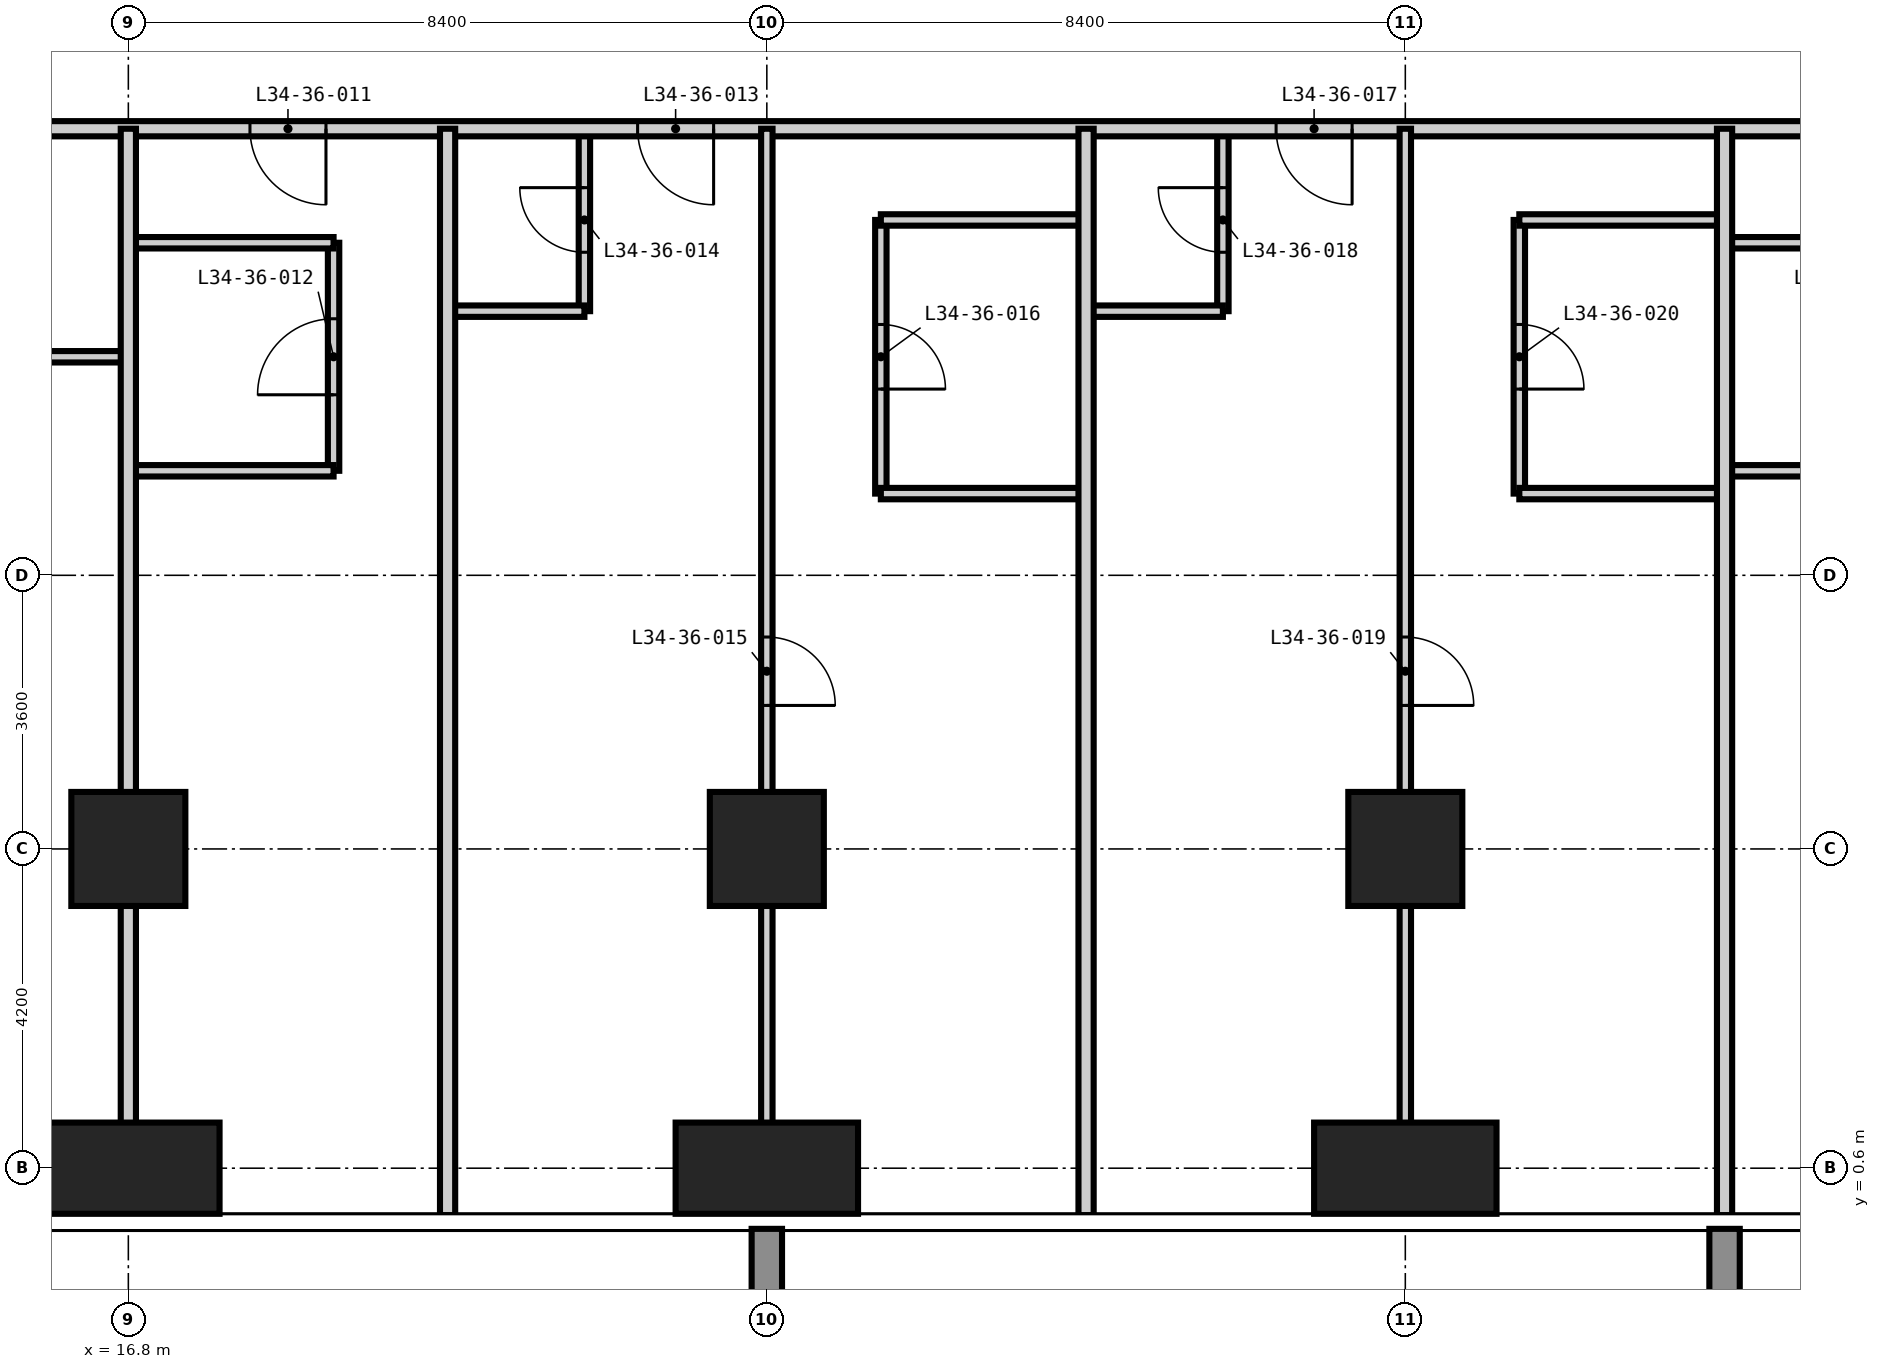
"""IFC4 building model, lengths in metres.
Left out: names, types, materials, properties, quantities, classifications, styles, units other than length and angle.
Written with IfcOpenShell. Run it as: python <this file> out.ifc"""

import sys

from ifc_helpers import new_model, si_unit, direction, frame, frame_2d, origin, origin_2d, place, context, subcontext, project, spatial, rectangle, extrude, element, fill, save


model = new_model("IFC4")
c1 = context("Model", 3, precision=1e-05, world=origin(), true_north=direction((0.0, 1.0)))
c2 = subcontext(c1, "Body", "Model", "MODEL_VIEW")
j1 = project(units=[si_unit("LENGTHUNIT", "METRE"), si_unit("PLANEANGLEUNIT", "RADIAN")], contexts=[c1])
p1 = place(None, origin())
s1 = spatial("IfcSite", under=j1, at=p1, CompositionType="ELEMENT")
p2 = place(p1, origin())
s2 = spatial("IfcBuilding", under=s1, at=p2, CompositionType="ELEMENT")
p3 = place(p2, frame((0.0, 0.0, 133.2)))
s3 = spatial("IfcBuildingStorey", under=s2, at=p3, CompositionType="ELEMENT", Elevation=133.2)
p4 = place(p3, frame((16.8, 0.6, -0.35), z_axis=(0.0, 0.0, 1.0), x_axis=(1.0, 0.0, 0.0)))
e1 = element("IfcColumn", 1, at=p4, inside=s3, PredefinedType="COLUMN", context=c2, shape_type="SweptSolid", body=[
    extrude(rectangle(XDim=2.4, YDim=1.2, at=origin_2d()), origin(), (0.0, 0.0, 1.0), 3.6),
])
p5 = place(p3, frame((16.8, 4.8, -0.35), z_axis=(0.0, 0.0, 1.0), x_axis=(1.0, 0.0, 0.0)))
e2 = element("IfcColumn", 2, at=p5, inside=s3, PredefinedType="COLUMN", context=c2, shape_type="SweptSolid", body=[
    extrude(rectangle(XDim=1.5, YDim=1.5, at=origin_2d()), origin(), (0.0, 0.0, 1.0), 3.6),
])
p6 = place(p3, frame((25.2, 0.6, -0.35), z_axis=(0.0, 0.0, 1.0), x_axis=(1.0, 0.0, 0.0)))
e3 = element("IfcColumn", 3, at=p6, inside=s3, PredefinedType="COLUMN", context=c2, shape_type="SweptSolid", body=[
    extrude(rectangle(XDim=2.4, YDim=1.2, at=origin_2d()), origin(), (0.0, 0.0, 1.0), 3.6),
])
p7 = place(p3, frame((25.2, 4.8, -0.35), z_axis=(0.0, 0.0, 1.0), x_axis=(1.0, 0.0, 0.0)))
e4 = element("IfcColumn", 4, at=p7, inside=s3, PredefinedType="COLUMN", context=c2, shape_type="SweptSolid", body=[
    extrude(rectangle(XDim=1.5, YDim=1.5, at=origin_2d()), origin(), (0.0, 0.0, 1.0), 3.6),
])
p8 = place(p3, frame((33.6, 0.6, -0.35), z_axis=(0.0, 0.0, 1.0), x_axis=(1.0, 0.0, 0.0)))
e5 = element("IfcColumn", 5, at=p8, inside=s3, PredefinedType="COLUMN", context=c2, shape_type="SweptSolid", body=[
    extrude(rectangle(XDim=2.4, YDim=1.2, at=origin_2d()), origin(), (0.0, 0.0, 1.0), 3.6),
])
p9 = place(p3, frame((33.6, 4.8, -0.35), z_axis=(0.0, 0.0, 1.0), x_axis=(1.0, 0.0, 0.0)))
e6 = element("IfcColumn", 6, at=p9, inside=s3, PredefinedType="COLUMN", context=c2, shape_type="SweptSolid", body=[
    extrude(rectangle(XDim=1.5, YDim=1.5, at=origin_2d()), origin(), (0.0, 0.0, 1.0), 3.6),
])
p10 = place(p3, frame((19.5, 9.775, 0.0), z_axis=(0.0, 0.0, 1.0), x_axis=(0.0, 1.0, 0.0)))
e7 = element("IfcWall", 7, at=p10, inside=s3, PredefinedType="PARTITIONING", context=c2, shape_type="SweptSolid", body=[
    extrude(rectangle(XDim=3.0, YDim=0.15, at=frame_2d((1.5, 0.0))), origin(), (0.0, 0.0, 1.0), 3.25),
])
p11 = place(p10, frame((1.0, 0.0, 0.0)))
e8 = element("IfcOpeningElement", 8, at=p11, cuts=e7, PredefinedType="OPENING", context=c2, shape_type="SweptSolid", body=[
    extrude(rectangle(XDim=1.0, YDim=2.1, at=frame_2d((0.5, 1.05))), frame((0.0, 0.085, 0.0), z_axis=(0.0, -1.0, 0.0), x_axis=(1.0, 0.0, 0.0)), (0.0, 0.0, 1.0), 0.17),
])
p12 = place(p3, frame((22.8, 11.875, 0.0), z_axis=(0.0, 0.0, 1.0), x_axis=(0.0, 1.0, 0.0)))
e9 = element("IfcWall", 9, at=p12, inside=s3, PredefinedType="PARTITIONING", context=c2, shape_type="SweptSolid", body=[
    extrude(rectangle(XDim=2.4, YDim=0.15, at=frame_2d((1.2, 0.0))), origin(), (0.0, 0.0, 1.0), 3.25),
])
p13 = place(p12, frame((0.775, 0.0, 0.0)))
e10 = element("IfcOpeningElement", 10, at=p13, cuts=e9, PredefinedType="OPENING", context=c2, shape_type="SweptSolid", body=[
    extrude(rectangle(XDim=0.85, YDim=2.1, at=frame_2d((0.425, 1.05))), frame((0.0, 0.085, 0.0), z_axis=(0.0, -1.0, 0.0), x_axis=(1.0, 0.0, 0.0)), (0.0, 0.0, 1.0), 0.17),
])
p14 = place(p3, frame((26.7, 9.475, 0.0), z_axis=(0.0, 0.0, 1.0), x_axis=(0.0, 1.0, 0.0)))
e11 = element("IfcWall", 11, at=p14, inside=s3, PredefinedType="PARTITIONING", context=c2, shape_type="SweptSolid", body=[
    extrude(rectangle(XDim=3.6, YDim=0.15, at=frame_2d((1.8, 0.0))), origin(), (0.0, 0.0, 1.0), 3.25),
])
p15 = place(p14, frame((1.375, 0.0, 0.0)))
e12 = element("IfcOpeningElement", 12, at=p15, cuts=e11, PredefinedType="OPENING", context=c2, shape_type="SweptSolid", body=[
    extrude(rectangle(XDim=0.85, YDim=2.1, at=frame_2d((0.425, 1.05))), frame((0.0, 0.085, 0.0), z_axis=(0.0, -1.0, 0.0), x_axis=(1.0, 0.0, 0.0)), (0.0, 0.0, 1.0), 0.17),
])
p16 = place(p3, frame((31.2, 11.875, 0.0), z_axis=(0.0, 0.0, 1.0), x_axis=(0.0, 1.0, 0.0)))
e13 = element("IfcWall", 13, at=p16, inside=s3, PredefinedType="PARTITIONING", context=c2, shape_type="SweptSolid", body=[
    extrude(rectangle(XDim=2.4, YDim=0.15, at=frame_2d((1.2, 0.0))), origin(), (0.0, 0.0, 1.0), 3.25),
])
p17 = place(p16, frame((0.775, 0.0, 0.0)))
e14 = element("IfcOpeningElement", 14, at=p17, cuts=e13, PredefinedType="OPENING", context=c2, shape_type="SweptSolid", body=[
    extrude(rectangle(XDim=0.85, YDim=2.1, at=frame_2d((0.425, 1.05))), frame((0.0, 0.085, 0.0), z_axis=(0.0, -1.0, 0.0), x_axis=(1.0, 0.0, 0.0)), (0.0, 0.0, 1.0), 0.17),
])
p18 = place(p3, frame((35.1, 9.475, 0.0), z_axis=(0.0, 0.0, 1.0), x_axis=(0.0, 1.0, 0.0)))
e15 = element("IfcWall", 15, at=p18, inside=s3, PredefinedType="PARTITIONING", context=c2, shape_type="SweptSolid", body=[
    extrude(rectangle(XDim=3.6, YDim=0.15, at=frame_2d((1.8, 0.0))), origin(), (0.0, 0.0, 1.0), 3.25),
])
p19 = place(p18, frame((1.375, 0.0, 0.0)))
e16 = element("IfcOpeningElement", 16, at=p19, cuts=e15, PredefinedType="OPENING", context=c2, shape_type="SweptSolid", body=[
    extrude(rectangle(XDim=0.85, YDim=2.1, at=frame_2d((0.425, 1.05))), frame((0.0, 0.085, 0.0), z_axis=(0.0, -1.0, 0.0), x_axis=(1.0, 0.0, 0.0)), (0.0, 0.0, 1.0), 0.17),
])
for number, where, z_axis, x_axis in (
    (17, (26.7, 9.475, 0.0), (0.0, 0.0, 1.0), (1.0, 0.0, 0.0)),
    (18, (35.1, 9.475, 0.0), (0.0, 0.0, 1.0), (1.0, 0.0, 0.0)),
    (19, (16.8, 9.775, 0.0), (0.0, 0.0, 1.0), (1.0, 0.0, 0.0)),
    (20, (37.8, 9.775, 0.0), (0.0, 0.0, 1.0), (1.0, 0.0, 0.0)),
):
    element("IfcWall", number, at=place(p3, frame(where, z_axis=z_axis, x_axis=x_axis)), inside=s3, PredefinedType="PARTITIONING", context=c2, shape_type="SweptSolid", body=[
        extrude(rectangle(XDim=2.7, YDim=0.15, at=frame_2d((1.35, 0.0))), origin(), (0.0, 0.0, 1.0), 3.25),
    ])
p20 = place(p3, frame((12.6, 11.275, 0.0), z_axis=(0.0, 0.0, 1.0), x_axis=(1.0, 0.0, 0.0)))
e21 = element("IfcWall", 21, at=p20, inside=s3, PredefinedType="PARTITIONING", context=c2, shape_type="SweptSolid", body=[
    extrude(rectangle(XDim=4.2, YDim=0.15, at=frame_2d((2.1, 0.0))), origin(), (0.0, 0.0, 1.0), 3.25),
])
p21 = place(p20, frame((1.675, 0.0, 0.0)))
e22 = element("IfcOpeningElement", 22, at=p21, cuts=e21, PredefinedType="OPENING", context=c2, shape_type="SweptSolid", body=[
    extrude(rectangle(XDim=0.85, YDim=2.1, at=frame_2d((0.425, 1.05))), frame((0.0, 0.085, 0.0), z_axis=(0.0, -1.0, 0.0), x_axis=(1.0, 0.0, 0.0)), (0.0, 0.0, 1.0), 0.17),
])
for number, where, z_axis, x_axis in (
    (23, (21.0, 11.875, 0.0), (0.0, 0.0, 1.0), (1.0, 0.0, 0.0)),
    (24, (29.4, 11.875, 0.0), (0.0, 0.0, 1.0), (1.0, 0.0, 0.0)),
):
    element("IfcWall", number, at=place(p3, frame(where, z_axis=z_axis, x_axis=x_axis)), inside=s3, PredefinedType="PARTITIONING", context=c2, shape_type="SweptSolid", body=[
        extrude(rectangle(XDim=1.8, YDim=0.15, at=frame_2d((0.9, 0.0))), origin(), (0.0, 0.0, 1.0), 3.25),
    ])
for number, where, z_axis, x_axis in (
    (25, (16.8, 12.775, 0.0), (0.0, 0.0, 1.0), (1.0, 0.0, 0.0)),
    (26, (37.8, 12.775, 0.0), (0.0, 0.0, 1.0), (1.0, 0.0, 0.0)),
    (27, (26.7, 13.075, 0.0), (0.0, 0.0, 1.0), (1.0, 0.0, 0.0)),
    (28, (35.1, 13.075, 0.0), (0.0, 0.0, 1.0), (1.0, 0.0, 0.0)),
):
    element("IfcWall", number, at=place(p3, frame(where, z_axis=z_axis, x_axis=x_axis)), inside=s3, PredefinedType="PARTITIONING", context=c2, shape_type="SweptSolid", body=[
        extrude(rectangle(XDim=2.7, YDim=0.15, at=frame_2d((1.35, 0.0))), origin(), (0.0, 0.0, 1.0), 3.25),
    ])
p22 = place(p3, frame((45.725, 14.275, 0.0), z_axis=(0.0, 0.0, 1.0), x_axis=(-1.0, 0.0, 0.0)))
e29 = element("IfcWall", 29, at=p22, inside=s3, PredefinedType="PARTITIONING", context=c2, shape_type="SweptSolid", body=[
    extrude(rectangle(XDim=33.125, YDim=0.2, at=frame_2d((16.562, 0.0))), origin(), (0.0, 0.0, 1.0), 3.25),
])
p23 = place(p22, frame((26.325, 0.0, 0.0)))
e30 = element("IfcOpeningElement", 30, at=p23, cuts=e29, PredefinedType="OPENING", context=c2, shape_type="SweptSolid", body=[
    extrude(rectangle(XDim=1.0, YDim=2.2, at=frame_2d((0.5, 1.1))), frame((0.0, 0.11, 0.0), z_axis=(0.0, -1.0, 0.0), x_axis=(1.0, 0.0, 0.0)), (0.0, 0.0, 1.0), 0.22),
])
p24 = place(p22, frame((21.225, 0.0, 0.0)))
e31 = element("IfcOpeningElement", 31, at=p24, cuts=e29, PredefinedType="OPENING", context=c2, shape_type="SweptSolid", body=[
    extrude(rectangle(XDim=1.0, YDim=2.2, at=frame_2d((0.5, 1.1))), frame((0.0, 0.11, 0.0), z_axis=(0.0, -1.0, 0.0), x_axis=(1.0, 0.0, 0.0)), (0.0, 0.0, 1.0), 0.22),
])
p25 = place(p22, frame((12.825, 0.0, 0.0)))
e32 = element("IfcOpeningElement", 32, at=p25, cuts=e29, PredefinedType="OPENING", context=c2, shape_type="SweptSolid", body=[
    extrude(rectangle(XDim=1.0, YDim=2.2, at=frame_2d((0.5, 1.1))), frame((0.0, 0.11, 0.0), z_axis=(0.0, -1.0, 0.0), x_axis=(1.0, 0.0, 0.0)), (0.0, 0.0, 1.0), 0.22),
])
p26 = place(p22, frame((5.325, 0.0, 0.0)))
e33 = element("IfcOpeningElement", 33, at=p26, cuts=e29, PredefinedType="OPENING", context=c2, shape_type="SweptSolid", body=[
    extrude(rectangle(XDim=1.0, YDim=2.2, at=frame_2d((0.5, 1.1))), frame((0.0, 0.11, 0.0), z_axis=(0.0, -1.0, 0.0), x_axis=(1.0, 0.0, 0.0)), (0.0, 0.0, 1.0), 0.22),
])
for number, where, z_axis, x_axis in (
    (34, (16.8, -0.018, 0.0), (0.0, 0.0, 1.0), (0.0, 1.0, 0.0)),
    (35, (21.0, -0.018, 0.0), (0.0, 0.0, 1.0), (0.0, 1.0, 0.0)),
    (36, (29.4, -0.018, 0.0), (0.0, 0.0, 1.0), (0.0, 1.0, 0.0)),
    (37, (37.8, -0.018, 0.0), (0.0, 0.0, 1.0), (0.0, 1.0, 0.0)),
):
    element("IfcWall", number, at=place(p3, frame(where, z_axis=z_axis, x_axis=x_axis)), inside=s3, PredefinedType="PARTITIONING", context=c2, shape_type="SweptSolid", body=[
        extrude(rectangle(XDim=14.293, YDim=0.2, at=frame_2d((7.146, 0.0))), origin(), (0.0, 0.0, 1.0), 3.25),
    ])
p27 = place(p3, frame((25.2, -0.018, 0.0), z_axis=(0.0, 0.0, 1.0), x_axis=(0.0, 1.0, 0.0)))
e38 = element("IfcWall", 38, at=p27, inside=s3, PredefinedType="PARTITIONING", context=c2, shape_type="SweptSolid", body=[
    extrude(rectangle(XDim=14.293, YDim=0.15, at=frame_2d((7.146, 0.0))), origin(), (0.0, 0.0, 1.0), 3.25),
])
p28 = place(p27, frame((6.706, 0.0, 0.0)))
e39 = element("IfcOpeningElement", 39, at=p28, cuts=e38, PredefinedType="OPENING", context=c2, shape_type="SweptSolid", body=[
    extrude(rectangle(XDim=0.9, YDim=2.1, at=frame_2d((0.45, 1.05))), frame((0.0, 0.085, 0.0), z_axis=(0.0, -1.0, 0.0), x_axis=(1.0, 0.0, 0.0)), (0.0, 0.0, 1.0), 0.17),
])
p29 = place(p3, frame((33.6, -0.018, 0.0), z_axis=(0.0, 0.0, 1.0), x_axis=(0.0, 1.0, 0.0)))
e40 = element("IfcWall", 40, at=p29, inside=s3, PredefinedType="PARTITIONING", context=c2, shape_type="SweptSolid", body=[
    extrude(rectangle(XDim=14.293, YDim=0.15, at=frame_2d((7.146, 0.0))), origin(), (0.0, 0.0, 1.0), 3.25),
])
p30 = place(p29, frame((6.706, 0.0, 0.0)))
e41 = element("IfcOpeningElement", 41, at=p30, cuts=e40, PredefinedType="OPENING", context=c2, shape_type="SweptSolid", body=[
    extrude(rectangle(XDim=0.9, YDim=2.1, at=frame_2d((0.45, 1.05))), frame((0.0, 0.085, 0.0), z_axis=(0.0, -1.0, 0.0), x_axis=(1.0, 0.0, 0.0)), (0.0, 0.0, 1.0), 0.17),
])
p31 = place(p23, origin())
e42 = element("IfcDoor", 42, at=p31, inside=s3, OperationType="SINGLE_SWING_LEFT", PredefinedType="DOOR", context=c2, shape_type="SweptSolid", body=[
    extrude(rectangle(XDim=1.0, YDim=2.2, at=frame_2d((0.5, 1.1))), frame((0.0, 0.025, 0.0), z_axis=(0.0, -1.0, 0.0), x_axis=(1.0, 0.0, 0.0)), (0.0, 0.0, 1.0), 0.05),
])
fill(e30, e42)
p32 = place(p11, origin())
e43 = element("IfcDoor", 43, at=p32, inside=s3, OperationType="SINGLE_SWING_LEFT", PredefinedType="DOOR", context=c2, shape_type="SweptSolid", body=[
    extrude(rectangle(XDim=1.0, YDim=2.1, at=frame_2d((0.5, 1.05))), frame((0.0, 0.025, 0.0), z_axis=(0.0, -1.0, 0.0), x_axis=(1.0, 0.0, 0.0)), (0.0, 0.0, 1.0), 0.05),
])
fill(e8, e43)
p33 = place(p24, origin())
e44 = element("IfcDoor", 44, at=p33, inside=s3, OperationType="SINGLE_SWING_LEFT", PredefinedType="DOOR", context=c2, shape_type="SweptSolid", body=[
    extrude(rectangle(XDim=1.0, YDim=2.2, at=frame_2d((0.5, 1.1))), frame((0.0, 0.025, 0.0), z_axis=(0.0, -1.0, 0.0), x_axis=(1.0, 0.0, 0.0)), (0.0, 0.0, 1.0), 0.05),
])
fill(e31, e44)
p34 = place(p13, origin())
e45 = element("IfcDoor", 45, at=p34, inside=s3, OperationType="SINGLE_SWING_RIGHT", PredefinedType="DOOR", context=c2, shape_type="SweptSolid", body=[
    extrude(rectangle(XDim=0.85, YDim=2.1, at=frame_2d((0.425, 1.05))), frame((0.0, 0.025, 0.0), z_axis=(0.0, -1.0, 0.0), x_axis=(1.0, 0.0, 0.0)), (0.0, 0.0, 1.0), 0.05),
])
fill(e10, e45)
p35 = place(p28, frame((0.9, 0.0, 0.0), z_axis=(0.0, 0.0, 1.0), x_axis=(-1.0, 0.0, 0.0)))
e46 = element("IfcDoor", 46, at=p35, inside=s3, OperationType="SINGLE_SWING_RIGHT", PredefinedType="DOOR", context=c2, shape_type="SweptSolid", body=[
    extrude(rectangle(XDim=0.9, YDim=2.1, at=frame_2d((0.45, 1.05))), frame((0.0, 0.025, 0.0), z_axis=(0.0, -1.0, 0.0), x_axis=(1.0, 0.0, 0.0)), (0.0, 0.0, 1.0), 0.05),
])
fill(e39, e46)
p36 = place(p15, frame((0.85, 0.0, 0.0), z_axis=(0.0, 0.0, 1.0), x_axis=(-1.0, 0.0, 0.0)))
e47 = element("IfcDoor", 47, at=p36, inside=s3, OperationType="SINGLE_SWING_RIGHT", PredefinedType="DOOR", context=c2, shape_type="SweptSolid", body=[
    extrude(rectangle(XDim=0.85, YDim=2.1, at=frame_2d((0.425, 1.05))), frame((0.0, 0.025, 0.0), z_axis=(0.0, -1.0, 0.0), x_axis=(1.0, 0.0, 0.0)), (0.0, 0.0, 1.0), 0.05),
])
fill(e12, e47)
p37 = place(p25, origin())
e48 = element("IfcDoor", 48, at=p37, inside=s3, OperationType="SINGLE_SWING_LEFT", PredefinedType="DOOR", context=c2, shape_type="SweptSolid", body=[
    extrude(rectangle(XDim=1.0, YDim=2.2, at=frame_2d((0.5, 1.1))), frame((0.0, 0.025, 0.0), z_axis=(0.0, -1.0, 0.0), x_axis=(1.0, 0.0, 0.0)), (0.0, 0.0, 1.0), 0.05),
])
fill(e32, e48)
p38 = place(p17, origin())
e49 = element("IfcDoor", 49, at=p38, inside=s3, OperationType="SINGLE_SWING_RIGHT", PredefinedType="DOOR", context=c2, shape_type="SweptSolid", body=[
    extrude(rectangle(XDim=0.85, YDim=2.1, at=frame_2d((0.425, 1.05))), frame((0.0, 0.025, 0.0), z_axis=(0.0, -1.0, 0.0), x_axis=(1.0, 0.0, 0.0)), (0.0, 0.0, 1.0), 0.05),
])
fill(e14, e49)
p39 = place(p30, frame((0.9, 0.0, 0.0), z_axis=(0.0, 0.0, 1.0), x_axis=(-1.0, 0.0, 0.0)))
e50 = element("IfcDoor", 50, at=p39, inside=s3, OperationType="SINGLE_SWING_RIGHT", PredefinedType="DOOR", context=c2, shape_type="SweptSolid", body=[
    extrude(rectangle(XDim=0.9, YDim=2.1, at=frame_2d((0.45, 1.05))), frame((0.0, 0.025, 0.0), z_axis=(0.0, -1.0, 0.0), x_axis=(1.0, 0.0, 0.0)), (0.0, 0.0, 1.0), 0.05),
])
fill(e41, e50)
p40 = place(p19, frame((0.85, 0.0, 0.0), z_axis=(0.0, 0.0, 1.0), x_axis=(-1.0, 0.0, 0.0)))
e51 = element("IfcDoor", 51, at=p40, inside=s3, OperationType="SINGLE_SWING_RIGHT", PredefinedType="DOOR", context=c2, shape_type="SweptSolid", body=[
    extrude(rectangle(XDim=0.85, YDim=2.1, at=frame_2d((0.425, 1.05))), frame((0.0, 0.025, 0.0), z_axis=(0.0, -1.0, 0.0), x_axis=(1.0, 0.0, 0.0)), (0.0, 0.0, 1.0), 0.05),
])
fill(e16, e51)
save(model, sys.argv[1])
